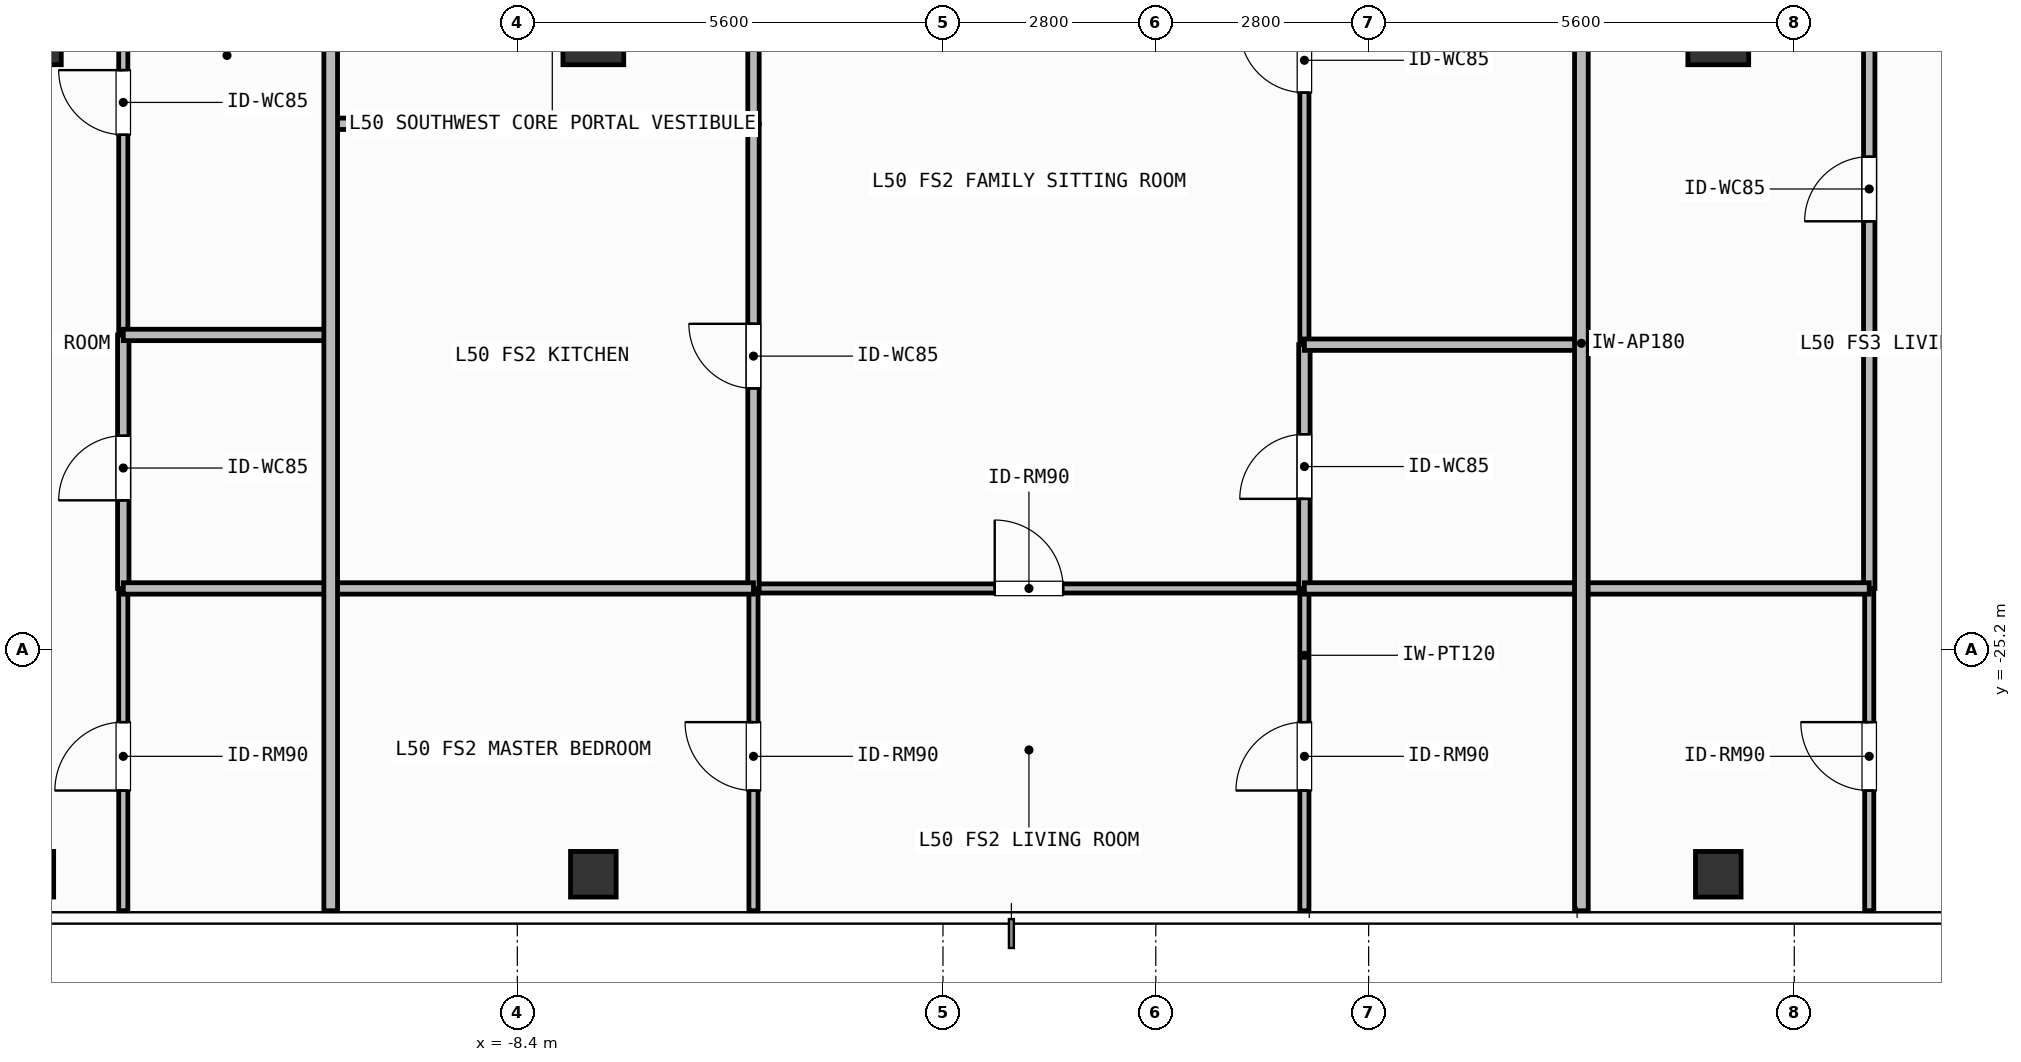
"""IFC4 building model, lengths in metres.
Left out: names, types, materials, properties, quantities, classifications, styles, units other than length and angle.
Written with IfcOpenShell. Run it as: python <this file> out.ifc"""

import sys

from ifc_helpers import new_model, si_unit, direction, frame, frame_2d, origin, origin_2d, place, context, subcontext, project, spatial, rectangle, hollow_rectangle, extrude, element, fill, save


model = new_model("IFC4")
c1 = context("Model", 3, precision=1e-05, world=origin(), true_north=direction((0.0, 1.0)))
c2 = subcontext(c1, "Body", "Model", "MODEL_VIEW")
j1 = project(units=[si_unit("LENGTHUNIT", "METRE"), si_unit("PLANEANGLEUNIT", "RADIAN")], contexts=[c1])
p1 = place(None, origin())
s1 = spatial("IfcSite", under=j1, at=p1, CompositionType="ELEMENT")
p2 = place(p1, origin())
s2 = spatial("IfcBuilding", under=s1, at=p2, CompositionType="ELEMENT")
p3 = place(p2, frame((0.0, 0.0, 203.1)))
s3 = spatial("IfcBuildingStorey", under=s2, at=p3, CompositionType="ELEMENT", Elevation=203.1)
for number, where, z_axis, x_axis in (
    (1, (-14.8, -17.1, 0.0), (0.0, 0.0, 1.0), (1.0, 0.0, 0.0)),
    (2, (-7.4, -17.1, 0.0), (0.0, 0.0, 1.0), (1.0, 0.0, 0.0)),
    (3, (7.4, -17.1, 0.0), (0.0, 0.0, 1.0), (1.0, 0.0, 0.0)),
):
    element("IfcColumn", number, at=place(p3, frame(where, z_axis=z_axis, x_axis=x_axis)), inside=s3, PredefinedType="COLUMN", context=c2, shape_type="SweptSolid", body=[
        extrude(hollow_rectangle(XDim=0.8, YDim=0.8, WallThickness=0.036, at=origin_2d()), origin(), (0.0, 0.0, 1.0), 3.9),
    ])
for number, where, z_axis, x_axis in (
    (4, (-14.8, -28.15, 0.0), (0.0, 0.0, 1.0), (1.0, 0.0, 0.0)),
    (5, (-7.4, -28.15, 0.0), (0.0, 0.0, 1.0), (1.0, 0.0, 0.0)),
    (6, (7.4, -28.15, 0.0), (0.0, 0.0, 1.0), (1.0, 0.0, 0.0)),
):
    element("IfcColumn", number, at=place(p3, frame(where, z_axis=z_axis, x_axis=x_axis)), inside=s3, PredefinedType="COLUMN", context=c2, shape_type="SweptSolid", body=[
        extrude(hollow_rectangle(XDim=0.6, YDim=0.6, WallThickness=0.028, at=origin_2d()), origin(), (0.0, 0.0, 1.0), 3.9),
    ])
p4 = place(p3, frame((-13.584, -24.39, 0.0), z_axis=(0.0, 0.0, 1.0), x_axis=(0.0, 1.0, 0.0)))
e7 = element("IfcWall", 7, at=p4, inside=s3, PredefinedType="PARTITIONING", context=c2, shape_type="SweptSolid", body=[
    extrude(rectangle(XDim=3.335, YDim=0.15, at=frame_2d((1.667, 0.0))), origin(), (0.0, 0.0, 1.0), 3.68),
])
p5 = place(p4, frame((1.159, 0.0, 0.0)))
e8 = element("IfcOpeningElement", 8, at=p5, cuts=e7, PredefinedType="OPENING", context=c2, shape_type="SweptSolid", body=[
    extrude(rectangle(XDim=0.85, YDim=2.1, at=frame_2d((0.425, 1.05))), frame((0.0, 0.085, 0.0), z_axis=(0.0, -1.0, 0.0), x_axis=(1.0, 0.0, 0.0)), (0.0, 0.0, 1.0), 0.17),
])
p6 = place(p3, frame((-13.584, -21.055, 0.0), z_axis=(0.0, 0.0, 1.0), x_axis=(0.0, 1.0, 0.0)))
e9 = element("IfcWall", 9, at=p6, inside=s3, PredefinedType="PARTITIONING", context=c2, shape_type="SweptSolid", body=[
    extrude(rectangle(XDim=7.355, YDim=0.12, at=frame_2d((3.677, 0.0))), origin(), (0.0, 0.0, 1.0), 3.68),
])
p7 = place(p6, frame((2.634, 0.0, 0.0)))
e10 = element("IfcOpeningElement", 10, at=p7, cuts=e9, PredefinedType="OPENING", context=c2, shape_type="SweptSolid", body=[
    extrude(rectangle(XDim=0.85, YDim=2.1, at=frame_2d((0.425, 1.05))), frame((0.0, 0.07, 0.0), z_axis=(0.0, -1.0, 0.0), x_axis=(1.0, 0.0, 0.0)), (0.0, 0.0, 1.0), 0.14),
])
p8 = place(p3, frame((-13.584, -28.63, 0.0), z_axis=(0.0, 0.0, 1.0), x_axis=(0.0, 1.0, 0.0)))
e11 = element("IfcWall", 11, at=p8, inside=s3, PredefinedType="PARTITIONING", context=c2, shape_type="SweptSolid", body=[
    extrude(rectangle(XDim=4.24, YDim=0.12, at=frame_2d((2.12, 0.0))), origin(), (0.0, 0.0, 1.0), 3.68),
])
p9 = place(p8, frame((1.581, 0.0, 0.0)))
e12 = element("IfcOpeningElement", 12, at=p9, cuts=e11, PredefinedType="OPENING", context=c2, shape_type="SweptSolid", body=[
    extrude(rectangle(XDim=0.9, YDim=2.1, at=frame_2d((0.45, 1.05))), frame((0.0, 0.07, 0.0), z_axis=(0.0, -1.0, 0.0), x_axis=(1.0, 0.0, 0.0)), (0.0, 0.0, 1.0), 0.14),
])
p10 = place(p3, frame((-5.293, -24.39, 0.0), z_axis=(0.0, 0.0, 1.0), x_axis=(1.0, 0.0, 0.0)))
e13 = element("IfcWall", 13, at=p10, inside=s3, PredefinedType="PARTITIONING", context=c2, shape_type="SweptSolid", body=[
    extrude(rectangle(XDim=7.248, YDim=0.12, at=frame_2d((3.624, 0.0))), origin(), (0.0, 0.0, 1.0), 3.68),
])
p11 = place(p10, frame((3.174, 0.0, 0.0)))
e14 = element("IfcOpeningElement", 14, at=p11, cuts=e13, PredefinedType="OPENING", context=c2, shape_type="SweptSolid", body=[
    extrude(rectangle(XDim=0.9, YDim=2.1, at=frame_2d((0.45, 1.05))), frame((0.0, 0.07, 0.0), z_axis=(0.0, -1.0, 0.0), x_axis=(1.0, 0.0, 0.0)), (0.0, 0.0, 1.0), 0.14),
])
p12 = place(p3, frame((-5.293, -24.39, 0.0), z_axis=(0.0, 0.0, 1.0), x_axis=(0.0, 1.0, 0.0)))
e15 = element("IfcWall", 15, at=p12, inside=s3, PredefinedType="PARTITIONING", context=c2, shape_type="SweptSolid", body=[
    extrude(rectangle(XDim=6.113, YDim=0.15, at=frame_2d((3.056, 0.0))), origin(), (0.0, 0.0, 1.0), 3.68),
])
p13 = place(p12, frame((2.632, 0.0, 0.0)))
e16 = element("IfcOpeningElement", 16, at=p13, cuts=e15, PredefinedType="OPENING", context=c2, shape_type="SweptSolid", body=[
    extrude(rectangle(XDim=0.85, YDim=2.1, at=frame_2d((0.425, 1.05))), frame((0.0, 0.085, 0.0), z_axis=(0.0, -1.0, 0.0), x_axis=(1.0, 0.0, 0.0)), (0.0, 0.0, 1.0), 0.17),
])
p14 = place(p3, frame((-5.293, -18.277, 0.0), z_axis=(0.0, 0.0, 1.0), x_axis=(0.0, 1.0, 0.0)))
e17 = element("IfcWall", 17, at=p14, inside=s3, PredefinedType="PARTITIONING", context=c2, shape_type="SweptSolid", body=[
    extrude(rectangle(XDim=4.577, YDim=0.15, at=frame_2d((2.289, 0.0))), origin(), (0.0, 0.0, 1.0), 3.68),
])
p15 = place(p14, frame((1.953, 0.0, 0.0)))
e18 = element("IfcOpeningElement", 18, at=p15, cuts=e17, PredefinedType="OPENING", context=c2, shape_type="SweptSolid", body=[
    extrude(rectangle(XDim=0.85, YDim=2.1, at=frame_2d((0.425, 1.05))), frame((0.0, 0.085, 0.0), z_axis=(0.0, -1.0, 0.0), x_axis=(1.0, 0.0, 0.0)), (0.0, 0.0, 1.0), 0.17),
])
p16 = place(p3, frame((-5.293, -28.63, 0.0), z_axis=(0.0, 0.0, 1.0), x_axis=(0.0, 1.0, 0.0)))
e19 = element("IfcWall", 19, at=p16, inside=s3, PredefinedType="PARTITIONING", context=c2, shape_type="SweptSolid", body=[
    extrude(rectangle(XDim=4.24, YDim=0.12, at=frame_2d((2.12, 0.0))), origin(), (0.0, 0.0, 1.0), 3.68),
])
p17 = place(p16, frame((1.581, 0.0, 0.0)))
e20 = element("IfcOpeningElement", 20, at=p17, cuts=e19, PredefinedType="OPENING", context=c2, shape_type="SweptSolid", body=[
    extrude(rectangle(XDim=0.9, YDim=2.1, at=frame_2d((0.45, 1.05))), frame((0.0, 0.07, 0.0), z_axis=(0.0, -1.0, 0.0), x_axis=(1.0, 0.0, 0.0)), (0.0, 0.0, 1.0), 0.14),
])
p18 = place(p3, frame((1.955, -24.39, 0.0), z_axis=(0.0, 0.0, 1.0), x_axis=(0.0, 1.0, 0.0)))
e21 = element("IfcWall", 21, at=p18, inside=s3, PredefinedType="PARTITIONING", context=c2, shape_type="SweptSolid", body=[
    extrude(rectangle(XDim=3.207, YDim=0.15, at=frame_2d((1.604, 0.0))), origin(), (0.0, 0.0, 1.0), 3.68),
])
p19 = place(p18, frame((1.178, 0.0, 0.0)))
e22 = element("IfcOpeningElement", 22, at=p19, cuts=e21, PredefinedType="OPENING", context=c2, shape_type="SweptSolid", body=[
    extrude(rectangle(XDim=0.85, YDim=2.1, at=frame_2d((0.425, 1.05))), frame((0.0, 0.085, 0.0), z_axis=(0.0, -1.0, 0.0), x_axis=(1.0, 0.0, 0.0)), (0.0, 0.0, 1.0), 0.17),
])
p20 = place(p3, frame((1.955, -21.183, 0.0), z_axis=(0.0, 0.0, 1.0), x_axis=(0.0, 1.0, 0.0)))
e23 = element("IfcWall", 23, at=p20, inside=s3, PredefinedType="PARTITIONING", context=c2, shape_type="SweptSolid", body=[
    extrude(rectangle(XDim=7.483, YDim=0.12, at=frame_2d((3.742, 0.0))), origin(), (0.0, 0.0, 1.0), 3.68),
])
p21 = place(p20, frame((3.316, 0.0, 0.0)))
e24 = element("IfcOpeningElement", 24, at=p21, cuts=e23, PredefinedType="OPENING", context=c2, shape_type="SweptSolid", body=[
    extrude(rectangle(XDim=0.85, YDim=2.1, at=frame_2d((0.425, 1.05))), frame((0.0, 0.07, 0.0), z_axis=(0.0, -1.0, 0.0), x_axis=(1.0, 0.0, 0.0)), (0.0, 0.0, 1.0), 0.14),
])
p22 = place(p3, frame((1.955, -28.63, 0.0), z_axis=(0.0, 0.0, 1.0), x_axis=(0.0, 1.0, 0.0)))
e25 = element("IfcWall", 25, at=p22, inside=s3, PredefinedType="PARTITIONING", context=c2, shape_type="SweptSolid", body=[
    extrude(rectangle(XDim=4.24, YDim=0.12, at=frame_2d((2.12, 0.0))), origin(), (0.0, 0.0, 1.0), 3.68),
])
p23 = place(p22, frame((1.581, 0.0, 0.0)))
e26 = element("IfcOpeningElement", 26, at=p23, cuts=e25, PredefinedType="OPENING", context=c2, shape_type="SweptSolid", body=[
    extrude(rectangle(XDim=0.9, YDim=2.1, at=frame_2d((0.45, 1.05))), frame((0.0, 0.07, 0.0), z_axis=(0.0, -1.0, 0.0), x_axis=(1.0, 0.0, 0.0)), (0.0, 0.0, 1.0), 0.14),
])
p24 = place(p3, frame((9.386, -24.39, 0.0), z_axis=(0.0, 0.0, 1.0), x_axis=(0.0, 1.0, 0.0)))
e27 = element("IfcWall", 27, at=p24, inside=s3, PredefinedType="PARTITIONING", context=c2, shape_type="SweptSolid", body=[
    extrude(rectangle(XDim=10.69, YDim=0.15, at=frame_2d((5.345, 0.0))), origin(), (0.0, 0.0, 1.0), 3.68),
])
p25 = place(p24, frame((4.83, 0.0, 0.0)))
e28 = element("IfcOpeningElement", 28, at=p25, cuts=e27, PredefinedType="OPENING", context=c2, shape_type="SweptSolid", body=[
    extrude(rectangle(XDim=0.85, YDim=2.1, at=frame_2d((0.425, 1.05))), frame((0.0, 0.085, 0.0), z_axis=(0.0, -1.0, 0.0), x_axis=(1.0, 0.0, 0.0)), (0.0, 0.0, 1.0), 0.17),
])
p26 = place(p3, frame((9.386, -28.63, 0.0), z_axis=(0.0, 0.0, 1.0), x_axis=(0.0, 1.0, 0.0)))
e29 = element("IfcWall", 29, at=p26, inside=s3, PredefinedType="PARTITIONING", context=c2, shape_type="SweptSolid", body=[
    extrude(rectangle(XDim=4.24, YDim=0.12, at=frame_2d((2.12, 0.0))), origin(), (0.0, 0.0, 1.0), 3.68),
])
p27 = place(p26, frame((1.581, 0.0, 0.0)))
e30 = element("IfcOpeningElement", 30, at=p27, cuts=e29, PredefinedType="OPENING", context=c2, shape_type="SweptSolid", body=[
    extrude(rectangle(XDim=0.9, YDim=2.1, at=frame_2d((0.45, 1.05))), frame((0.0, 0.07, 0.0), z_axis=(0.0, -1.0, 0.0), x_axis=(1.0, 0.0, 0.0)), (0.0, 0.0, 1.0), 0.14),
])
for number, where, z_axis, x_axis in (
    (31, (-13.584, -21.055, 0.0), (0.0, 0.0, 1.0), (1.0, 0.0, 0.0)),
    (32, (-13.584, -24.39, 0.0), (0.0, 0.0, 1.0), (1.0, 0.0, 0.0)),
):
    element("IfcWall", number, at=place(p3, frame(where, z_axis=z_axis, x_axis=x_axis)), inside=s3, PredefinedType="PARTITIONING", context=c2, shape_type="SweptSolid", body=[
        extrude(rectangle(XDim=2.729, YDim=0.15, at=frame_2d((1.365, 0.0))), origin(), (0.0, 0.0, 1.0), 3.68),
    ])
for number, where, z_axis, x_axis in (
    (33, (-10.855, -18.277, 0.0), (0.0, 0.0, 1.0), (1.0, 0.0, 0.0)),
    (34, (-10.855, -24.39, 0.0), (0.0, 0.0, 1.0), (1.0, 0.0, 0.0)),
):
    element("IfcWall", number, at=place(p3, frame(where, z_axis=z_axis, x_axis=x_axis)), inside=s3, PredefinedType="PARTITIONING", context=c2, shape_type="SweptSolid", body=[
        extrude(rectangle(XDim=5.562, YDim=0.15, at=frame_2d((2.781, 0.0))), origin(), (0.0, 0.0, 1.0), 3.68),
    ])
for number, where, z_axis, x_axis in (
    (35, (1.955, -21.183, 0.0), (0.0, 0.0, 1.0), (1.0, 0.0, 0.0)),
    (36, (1.955, -24.39, 0.0), (0.0, 0.0, 1.0), (1.0, 0.0, 0.0)),
):
    element("IfcWall", number, at=place(p3, frame(where, z_axis=z_axis, x_axis=x_axis)), inside=s3, PredefinedType="PARTITIONING", context=c2, shape_type="SweptSolid", body=[
        extrude(rectangle(XDim=3.644, YDim=0.15, at=frame_2d((1.822, 0.0))), origin(), (0.0, 0.0, 1.0), 3.68),
    ])
p28 = place(p3, frame((-10.855, -28.63, 0.0), z_axis=(0.0, 0.0, 1.0), x_axis=(0.0, 1.0, 0.0)))
e37 = element("IfcWall", 37, at=p28, inside=s3, PredefinedType="PARTITIONING", context=c2, shape_type="SweptSolid", body=[
    extrude(rectangle(XDim=14.93, YDim=0.18, at=frame_2d((7.465, 0.0))), origin(), (0.0, 0.0, 1.0), 3.68),
])
p29 = place(p3, frame((5.599, -24.39, 0.0), z_axis=(0.0, 0.0, 1.0), x_axis=(1.0, 0.0, 0.0)))
e38 = element("IfcWall", 38, at=p29, inside=s3, PredefinedType="PARTITIONING", context=c2, shape_type="SweptSolid", body=[
    extrude(rectangle(XDim=3.787, YDim=0.15, at=frame_2d((1.894, 0.0))), origin(), (0.0, 0.0, 1.0), 3.68),
])
p30 = place(p3, frame((5.599, -28.63, 0.0), z_axis=(0.0, 0.0, 1.0), x_axis=(0.0, 1.0, 0.0)))
e39 = element("IfcWall", 39, at=p30, inside=s3, PredefinedType="PARTITIONING", context=c2, shape_type="SweptSolid", body=[
    extrude(rectangle(XDim=14.93, YDim=0.18, at=frame_2d((7.465, 0.0))), origin(), (0.0, 0.0, 1.0), 3.68),
])
p31 = place(p5, origin())
e40 = element("IfcDoor", 40, at=p31, inside=s3, OperationType="SINGLE_SWING_LEFT", PredefinedType="DOOR", context=c2, shape_type="SweptSolid", body=[
    extrude(rectangle(XDim=0.85, YDim=2.1, at=frame_2d((0.425, 1.05))), frame((0.0, 0.025, 0.0), z_axis=(0.0, -1.0, 0.0), x_axis=(1.0, 0.0, 0.0)), (0.0, 0.0, 1.0), 0.05),
])
fill(e8, e40)
p32 = place(p7, origin())
e41 = element("IfcDoor", 41, at=p32, inside=s3, OperationType="SINGLE_SWING_RIGHT", PredefinedType="DOOR", context=c2, shape_type="SweptSolid", body=[
    extrude(rectangle(XDim=0.85, YDim=2.1, at=frame_2d((0.425, 1.05))), frame((0.0, 0.025, 0.0), z_axis=(0.0, -1.0, 0.0), x_axis=(1.0, 0.0, 0.0)), (0.0, 0.0, 1.0), 0.05),
])
fill(e10, e41)
p33 = place(p9, origin())
e42 = element("IfcDoor", 42, at=p33, inside=s3, OperationType="SINGLE_SWING_LEFT", PredefinedType="DOOR", context=c2, shape_type="SweptSolid", body=[
    extrude(rectangle(XDim=0.9, YDim=2.1, at=frame_2d((0.45, 1.05))), frame((0.0, 0.025, 0.0), z_axis=(0.0, -1.0, 0.0), x_axis=(1.0, 0.0, 0.0)), (0.0, 0.0, 1.0), 0.05),
])
fill(e12, e42)
p34 = place(p11, origin())
e43 = element("IfcDoor", 43, at=p34, inside=s3, OperationType="SINGLE_SWING_LEFT", PredefinedType="DOOR", context=c2, shape_type="SweptSolid", body=[
    extrude(rectangle(XDim=0.9, YDim=2.1, at=frame_2d((0.45, 1.05))), frame((0.0, 0.025, 0.0), z_axis=(0.0, -1.0, 0.0), x_axis=(1.0, 0.0, 0.0)), (0.0, 0.0, 1.0), 0.05),
])
fill(e14, e43)
p35 = place(p13, origin())
e44 = element("IfcDoor", 44, at=p35, inside=s3, OperationType="SINGLE_SWING_RIGHT", PredefinedType="DOOR", context=c2, shape_type="SweptSolid", body=[
    extrude(rectangle(XDim=0.85, YDim=2.1, at=frame_2d((0.425, 1.05))), frame((0.0, 0.025, 0.0), z_axis=(0.0, -1.0, 0.0), x_axis=(1.0, 0.0, 0.0)), (0.0, 0.0, 1.0), 0.05),
])
fill(e16, e44)
p36 = place(p17, origin())
e45 = element("IfcDoor", 45, at=p36, inside=s3, OperationType="SINGLE_SWING_RIGHT", PredefinedType="DOOR", context=c2, shape_type="SweptSolid", body=[
    extrude(rectangle(XDim=0.9, YDim=2.1, at=frame_2d((0.45, 1.05))), frame((0.0, 0.025, 0.0), z_axis=(0.0, -1.0, 0.0), x_axis=(1.0, 0.0, 0.0)), (0.0, 0.0, 1.0), 0.05),
])
fill(e20, e45)
p37 = place(p19, origin())
e46 = element("IfcDoor", 46, at=p37, inside=s3, OperationType="SINGLE_SWING_LEFT", PredefinedType="DOOR", context=c2, shape_type="SweptSolid", body=[
    extrude(rectangle(XDim=0.85, YDim=2.1, at=frame_2d((0.425, 1.05))), frame((0.0, 0.025, 0.0), z_axis=(0.0, -1.0, 0.0), x_axis=(1.0, 0.0, 0.0)), (0.0, 0.0, 1.0), 0.05),
])
fill(e22, e46)
p38 = place(p21, origin())
e47 = element("IfcDoor", 47, at=p38, inside=s3, OperationType="SINGLE_SWING_RIGHT", PredefinedType="DOOR", context=c2, shape_type="SweptSolid", body=[
    extrude(rectangle(XDim=0.85, YDim=2.1, at=frame_2d((0.425, 1.05))), frame((0.0, 0.025, 0.0), z_axis=(0.0, -1.0, 0.0), x_axis=(1.0, 0.0, 0.0)), (0.0, 0.0, 1.0), 0.05),
])
fill(e24, e47)
p39 = place(p23, origin())
e48 = element("IfcDoor", 48, at=p39, inside=s3, OperationType="SINGLE_SWING_LEFT", PredefinedType="DOOR", context=c2, shape_type="SweptSolid", body=[
    extrude(rectangle(XDim=0.9, YDim=2.1, at=frame_2d((0.45, 1.05))), frame((0.0, 0.025, 0.0), z_axis=(0.0, -1.0, 0.0), x_axis=(1.0, 0.0, 0.0)), (0.0, 0.0, 1.0), 0.05),
])
fill(e26, e48)
p40 = place(p25, origin())
e49 = element("IfcDoor", 49, at=p40, inside=s3, OperationType="SINGLE_SWING_LEFT", PredefinedType="DOOR", context=c2, shape_type="SweptSolid", body=[
    extrude(rectangle(XDim=0.85, YDim=2.1, at=frame_2d((0.425, 1.05))), frame((0.0, 0.025, 0.0), z_axis=(0.0, -1.0, 0.0), x_axis=(1.0, 0.0, 0.0)), (0.0, 0.0, 1.0), 0.05),
])
fill(e28, e49)
p41 = place(p27, origin())
e50 = element("IfcDoor", 50, at=p41, inside=s3, OperationType="SINGLE_SWING_RIGHT", PredefinedType="DOOR", context=c2, shape_type="SweptSolid", body=[
    extrude(rectangle(XDim=0.9, YDim=2.1, at=frame_2d((0.45, 1.05))), frame((0.0, 0.025, 0.0), z_axis=(0.0, -1.0, 0.0), x_axis=(1.0, 0.0, 0.0)), (0.0, 0.0, 1.0), 0.05),
])
fill(e30, e50)
save(model, sys.argv[1])
